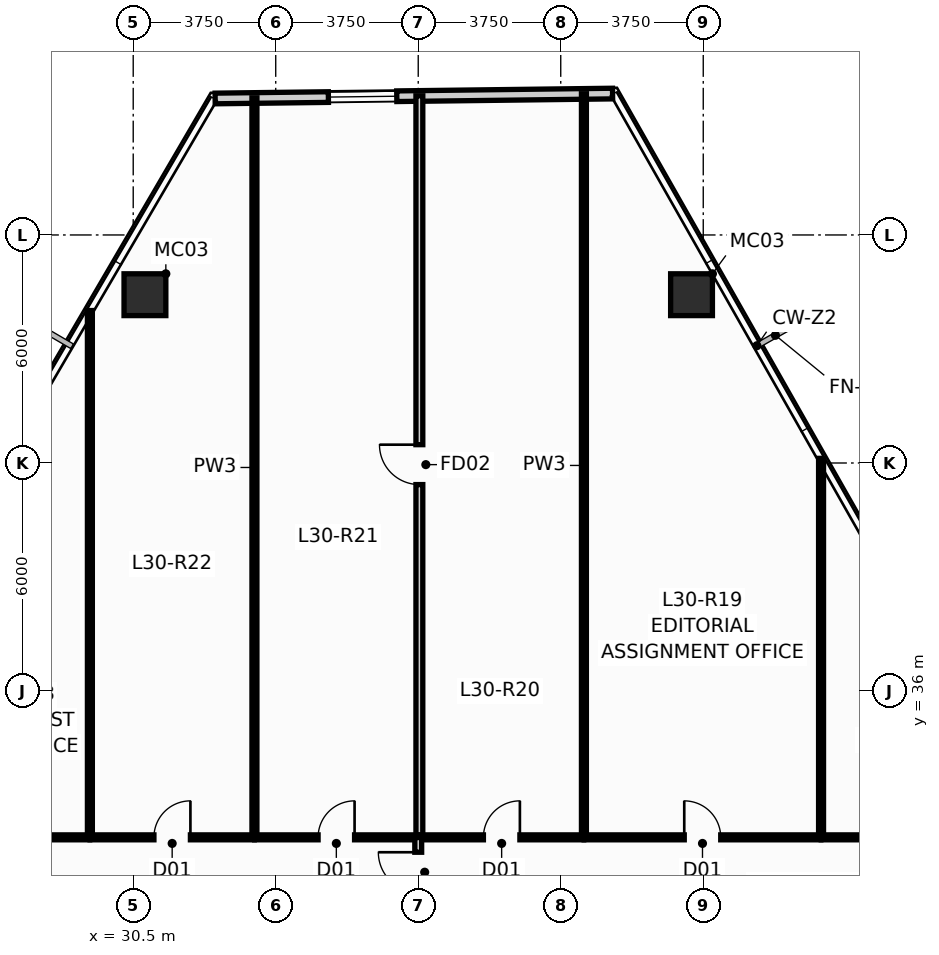
"""IFC4 building model, lengths in metres.
Left out: names, types, materials, properties, quantities, classifications, styles, units other than length and angle.
Written with IfcOpenShell. Run it as: python <this file> out.ifc"""

import sys

from ifc_helpers import new_model, si_unit, direction, frame, frame_2d, origin, origin_2d, place, context, subcontext, project, spatial, rectangle, hollow_rectangle, extrude, source, transform, mapped, element, fill, save


model = new_model("IFC4")
c1 = context("Model", 3, precision=1e-05, world=origin(), true_north=direction((0.0, 1.0)))
c2 = subcontext(c1, "Body", "Model", "MODEL_VIEW")
j1 = project(units=[si_unit("LENGTHUNIT", "METRE"), si_unit("PLANEANGLEUNIT", "RADIAN")], contexts=[c1])
p1 = place(None, origin())
s1 = spatial("IfcSite", under=j1, at=p1, CompositionType="ELEMENT")
p2 = place(p1, origin())
s2 = spatial("IfcBuilding", under=s1, at=p2, CompositionType="ELEMENT")
p3 = place(p2, frame((0.0, 0.0, 116.35)))
s3 = spatial("IfcBuildingStorey", under=s2, at=p3, CompositionType="ELEMENT", Elevation=116.35)
m1 = source(origin(), c2, "Body", "SweptSolid", [
    extrude(hollow_rectangle(XDim=1.1, YDim=1.1, WallThickness=0.06, at=origin_2d()), origin(), (0.0, 0.0, 1.0), 3.651),
])
for number, where, z_axis, x_axis in (
    (1, (45.191, 46.428, 0.0), (-0.024, 0.002, 1.0), (-0.073, -0.997, 0.0)),
    (2, (30.809, 46.428, 0.0), (0.024, 0.002, 1.0), (-0.073, 0.997, 0.0)),
):
    element("IfcColumn", number, at=place(p3, frame(where, z_axis=z_axis, x_axis=x_axis)), inside=s3, PredefinedType="COLUMN", context=c2, shape_type="MappedRepresentation", body=[
        mapped(m1, transform((0.0, 0.0, 0.0), scale=1.0)),
    ])
p4 = place(p3, frame((32.656, 51.591, 0.0), z_axis=(0.0, 0.0, 1.0), x_axis=(0.999923466061, 0.01237182363, 0.0)))
e3 = element("IfcWall", 3, at=p4, inside=s3, PredefinedType="STANDARD", context=c2, shape_type="SweptSolid", body=[
    extrude(rectangle(XDim=10.459, YDim=0.28, at=frame_2d((5.229, 0.0))), origin(), (0.0, 0.0, 1.0), 3.4),
])
p5 = place(p4, frame((2.98, 0.0, 0.9)))
e4 = element("IfcOpeningElement", 4, at=p5, cuts=e3, PredefinedType="OPENING", context=c2, shape_type="SweptSolid", body=[
    extrude(rectangle(XDim=1.8, YDim=1.8, at=frame_2d((0.9, 0.9))), frame((0.0, 0.152, 0.0), z_axis=(0.0, -1.0, 0.0), x_axis=(1.0, 0.0, 0.0)), (0.0, 0.0, 1.0), 0.304),
])
p6 = place(p3, frame((42.36, 32.155, 0.0), z_axis=(0.0, 0.0, 1.0), x_axis=(0.0, 1.0, 0.0)))
e5 = element("IfcWall", 5, at=p6, inside=s3, PredefinedType="PARTITIONING", context=c2, shape_type="SweptSolid", body=[
    extrude(rectangle(XDim=19.561, YDim=0.13, at=frame_2d((9.781, 0.0))), origin(), (0.0, 0.0, 1.0), 3.4),
])
p7 = place(p3, frame((38.03, 32.155, 0.0), z_axis=(0.0, 0.0, 1.0), x_axis=(0.0, 1.0, 0.0)))
e6 = element("IfcWall", 6, at=p7, inside=s3, PredefinedType="PARTITIONING", context=c2, shape_type="SweptSolid", body=[
    extrude(rectangle(XDim=19.508, YDim=0.18, at=frame_2d((9.754, 0.0))), origin(), (0.0, 0.0, 1.0), 3.4),
])
p8 = place(p7, frame((9.277, 0.0, 0.0)))
e7 = element("IfcOpeningElement", 7, at=p8, cuts=e6, PredefinedType="OPENING", context=c2, shape_type="SweptSolid", body=[
    extrude(rectangle(XDim=1.05, YDim=2.15, at=frame_2d((0.525, 1.075))), frame((0.0, 0.102, 0.0), z_axis=(0.0, -1.0, 0.0), x_axis=(1.0, 0.0, 0.0)), (0.0, 0.0, 1.0), 0.204),
])
p9 = place(p3, frame((33.69, 32.155, 0.0), z_axis=(0.0, 0.0, 1.0), x_axis=(0.0, 1.0, 0.0)))
e8 = element("IfcWall", 8, at=p9, inside=s3, PredefinedType="PARTITIONING", context=c2, shape_type="SweptSolid", body=[
    extrude(rectangle(XDim=19.454, YDim=0.13, at=frame_2d((9.727, 0.0))), origin(), (0.0, 0.0, 1.0), 3.4),
])
p10 = place(p3, frame((29.36, 32.155, 0.0), z_axis=(0.0, 0.0, 1.0), x_axis=(0.0, 1.0, 0.0)))
e9 = element("IfcWall", 9, at=p10, inside=s3, PredefinedType="PARTITIONING", context=c2, shape_type="SweptSolid", body=[
    extrude(rectangle(XDim=13.856, YDim=0.13, at=frame_2d((6.928, 0.0))), origin(), (0.0, 0.0, 1.0), 3.4),
])
p11 = place(p3, frame((48.6, 32.155, 0.0), z_axis=(0.0, 0.0, 1.0), x_axis=(0.0, 1.0, 0.0)))
e10 = element("IfcWall", 10, at=p11, inside=s3, PredefinedType="PARTITIONING", context=c2, shape_type="SweptSolid", body=[
    extrude(rectangle(XDim=9.967, YDim=0.13, at=frame_2d((4.983, 0.0))), origin(), (0.0, 0.0, 1.0), 3.4),
])
p12 = place(p3, frame((42.365, 32.15, 0.0), z_axis=(0.0, 0.0, 1.0), x_axis=(1.0, 0.0, 0.0)))
e11 = element("IfcWall", 11, at=p12, inside=s3, PredefinedType="PARTITIONING", context=c2, shape_type="SweptSolid", body=[
    extrude(rectangle(XDim=6.23, YDim=0.13, at=frame_2d((3.115, 0.0))), origin(), (0.0, 0.0, 1.0), 3.4),
])
p13 = place(p12, frame((2.635, 0.0, 0.0)))
e12 = element("IfcOpeningElement", 12, at=p13, cuts=e11, PredefinedType="OPENING", context=c2, shape_type="SweptSolid", body=[
    extrude(rectangle(XDim=0.96, YDim=2.15, at=frame_2d((0.48, 1.075))), frame((0.0, 0.077, 0.0), z_axis=(0.0, -1.0, 0.0), x_axis=(1.0, 0.0, 0.0)), (0.0, 0.0, 1.0), 0.154),
])
p14 = place(p3, frame((29.365, 32.15, 0.0), z_axis=(0.0, 0.0, 1.0), x_axis=(1.0, 0.0, 0.0)))
e13 = element("IfcWall", 13, at=p14, inside=s3, PredefinedType="PARTITIONING", context=c2, shape_type="SweptSolid", body=[
    extrude(rectangle(XDim=4.32, YDim=0.13, at=frame_2d((2.16, 0.0))), origin(), (0.0, 0.0, 1.0), 3.4),
])
p15 = place(p14, frame((1.68, 0.0, 0.0)))
e14 = element("IfcOpeningElement", 14, at=p15, cuts=e13, PredefinedType="OPENING", context=c2, shape_type="SweptSolid", body=[
    extrude(rectangle(XDim=0.96, YDim=2.15, at=frame_2d((0.48, 1.075))), frame((0.0, 0.077, 0.0), z_axis=(0.0, -1.0, 0.0), x_axis=(1.0, 0.0, 0.0)), (0.0, 0.0, 1.0), 0.154),
])
p16 = place(p3, frame((38.035, 32.15, 0.0), z_axis=(0.0, 0.0, 1.0), x_axis=(1.0, 0.0, 0.0)))
e15 = element("IfcWall", 15, at=p16, inside=s3, PredefinedType="PARTITIONING", context=c2, shape_type="SweptSolid", body=[
    extrude(rectangle(XDim=4.32, YDim=0.13, at=frame_2d((2.16, 0.0))), origin(), (0.0, 0.0, 1.0), 3.4),
])
p17 = place(p16, frame((1.68, 0.0, 0.0)))
e16 = element("IfcOpeningElement", 16, at=p17, cuts=e15, PredefinedType="OPENING", context=c2, shape_type="SweptSolid", body=[
    extrude(rectangle(XDim=0.96, YDim=2.15, at=frame_2d((0.48, 1.075))), frame((0.0, 0.077, 0.0), z_axis=(0.0, -1.0, 0.0), x_axis=(1.0, 0.0, 0.0)), (0.0, 0.0, 1.0), 0.154),
])
p18 = place(p3, frame((33.695, 32.15, 0.0), z_axis=(0.0, 0.0, 1.0), x_axis=(1.0, 0.0, 0.0)))
e17 = element("IfcWall", 17, at=p18, inside=s3, PredefinedType="PARTITIONING", context=c2, shape_type="SweptSolid", body=[
    extrude(rectangle(XDim=4.3, YDim=0.13, at=frame_2d((2.15, 0.0))), origin(), (0.0, 0.0, 1.0), 3.4),
])
p19 = place(p18, frame((1.67, 0.0, 0.0)))
e18 = element("IfcOpeningElement", 18, at=p19, cuts=e17, PredefinedType="OPENING", context=c2, shape_type="SweptSolid", body=[
    extrude(rectangle(XDim=0.96, YDim=2.15, at=frame_2d((0.48, 1.075))), frame((0.0, 0.077, 0.0), z_axis=(0.0, -1.0, 0.0), x_axis=(1.0, 0.0, 0.0)), (0.0, 0.0, 1.0), 0.154),
])
p20 = place(p3, frame((25.405, 32.15, 0.0), z_axis=(0.0, 0.0, 1.0), x_axis=(1.0, 0.0, 0.0)))
e19 = element("IfcWall", 19, at=p20, inside=s3, PredefinedType="PARTITIONING", context=c2, shape_type="SweptSolid", body=[
    extrude(rectangle(XDim=3.95, YDim=0.13, at=frame_2d((1.975, 0.0))), origin(), (0.0, 0.0, 1.0), 3.4),
])
p21 = place(p20, frame((1.495, 0.0, 0.0)))
e20 = element("IfcOpeningElement", 20, at=p21, cuts=e19, PredefinedType="OPENING", context=c2, shape_type="SweptSolid", body=[
    extrude(rectangle(XDim=0.96, YDim=2.15, at=frame_2d((0.48, 1.075))), frame((0.0, 0.077, 0.0), z_axis=(0.0, -1.0, 0.0), x_axis=(1.0, 0.0, 0.0)), (0.0, 0.0, 1.0), 0.154),
])
p22 = place(p3, frame((48.605, 32.15, 0.0), z_axis=(0.0, 0.0, 1.0), x_axis=(1.0, 0.0, 0.0)))
e21 = element("IfcWall", 21, at=p22, inside=s3, PredefinedType="PARTITIONING", context=c2, shape_type="SweptSolid", body=[
    extrude(rectangle(XDim=1.99, YDim=0.13, at=frame_2d((0.995, 0.0))), origin(), (0.0, 0.0, 1.0), 3.4),
])
p23 = place(p3, frame((38.0, 30.32, 0.0), z_axis=(0.0, 0.0, 1.0), x_axis=(0.0, 1.0, 0.0)))
e22 = element("IfcWall", 22, at=p23, inside=s3, PredefinedType="PARTITIONING", context=c2, shape_type="SweptSolid", body=[
    extrude(rectangle(XDim=1.825, YDim=0.18, at=frame_2d((0.913, 0.0))), origin(), (0.0, 0.0, 1.0), 3.4),
])
p24 = place(p23, frame((0.388, 0.0, 0.0)))
e23 = element("IfcOpeningElement", 23, at=p24, cuts=e22, PredefinedType="OPENING", context=c2, shape_type="SweptSolid", body=[
    extrude(rectangle(XDim=1.05, YDim=2.15, at=frame_2d((0.525, 1.075))), frame((0.0, 0.102, 0.0), z_axis=(0.0, -1.0, 0.0), x_axis=(1.0, 0.0, 0.0)), (0.0, 0.0, 1.0), 0.204),
])
p25 = place(p5, origin())
e24 = element("IfcWindow", 24, at=p25, inside=s3, PartitioningType="SINGLE_PANEL", PredefinedType="WINDOW", context=c2, shape_type="SweptSolid", body=[
    extrude(rectangle(XDim=1.8, YDim=1.8, at=frame_2d((0.9, 0.9))), frame((0.0, 0.03, 0.0), z_axis=(0.0, -1.0, 0.0), x_axis=(1.0, 0.0, 0.0)), (0.0, 0.0, 1.0), 0.06),
])
fill(e4, e24)
p26 = place(p8, origin())
e25 = element("IfcDoor", 25, at=p26, inside=s3, OperationType="SINGLE_SWING_RIGHT", PredefinedType="DOOR", context=c2, shape_type="SweptSolid", body=[
    extrude(rectangle(XDim=1.05, YDim=2.15, at=frame_2d((0.525, 1.075))), frame((0.0, 0.025, 0.0), z_axis=(0.0, -1.0, 0.0), x_axis=(1.0, 0.0, 0.0)), (0.0, 0.0, 1.0), 0.05),
])
fill(e7, e25)
p27 = place(p13, origin())
e26 = element("IfcDoor", 26, at=p27, inside=s3, OperationType="SINGLE_SWING_LEFT", PredefinedType="DOOR", context=c2, shape_type="SweptSolid", body=[
    extrude(rectangle(XDim=0.96, YDim=2.15, at=frame_2d((0.48, 1.075))), frame((0.0, 0.025, 0.0), z_axis=(0.0, -1.0, 0.0), x_axis=(1.0, 0.0, 0.0)), (0.0, 0.0, 1.0), 0.05),
])
fill(e12, e26)
p28 = place(p15, origin())
e27 = element("IfcDoor", 27, at=p28, inside=s3, OperationType="SINGLE_SWING_RIGHT", PredefinedType="DOOR", context=c2, shape_type="SweptSolid", body=[
    extrude(rectangle(XDim=0.96, YDim=2.15, at=frame_2d((0.48, 1.075))), frame((0.0, 0.025, 0.0), z_axis=(0.0, -1.0, 0.0), x_axis=(1.0, 0.0, 0.0)), (0.0, 0.0, 1.0), 0.05),
])
fill(e14, e27)
p29 = place(p17, origin())
e28 = element("IfcDoor", 28, at=p29, inside=s3, OperationType="SINGLE_SWING_RIGHT", PredefinedType="DOOR", context=c2, shape_type="SweptSolid", body=[
    extrude(rectangle(XDim=0.96, YDim=2.15, at=frame_2d((0.48, 1.075))), frame((0.0, 0.025, 0.0), z_axis=(0.0, -1.0, 0.0), x_axis=(1.0, 0.0, 0.0)), (0.0, 0.0, 1.0), 0.05),
])
fill(e16, e28)
p30 = place(p19, origin())
e29 = element("IfcDoor", 29, at=p30, inside=s3, OperationType="SINGLE_SWING_RIGHT", PredefinedType="DOOR", context=c2, shape_type="SweptSolid", body=[
    extrude(rectangle(XDim=0.96, YDim=2.15, at=frame_2d((0.48, 1.075))), frame((0.0, 0.025, 0.0), z_axis=(0.0, -1.0, 0.0), x_axis=(1.0, 0.0, 0.0)), (0.0, 0.0, 1.0), 0.05),
])
fill(e18, e29)
p31 = place(p24, origin())
e30 = element("IfcDoor", 30, at=p31, inside=s3, OperationType="SINGLE_SWING_RIGHT", PredefinedType="DOOR", context=c2, shape_type="SweptSolid", body=[
    extrude(rectangle(XDim=1.05, YDim=2.15, at=frame_2d((0.525, 1.075))), frame((0.0, 0.025, 0.0), z_axis=(0.0, -1.0, 0.0), x_axis=(1.0, 0.0, 0.0)), (0.0, 0.0, 1.0), 0.05),
])
fill(e23, e30)
save(model, sys.argv[1])
